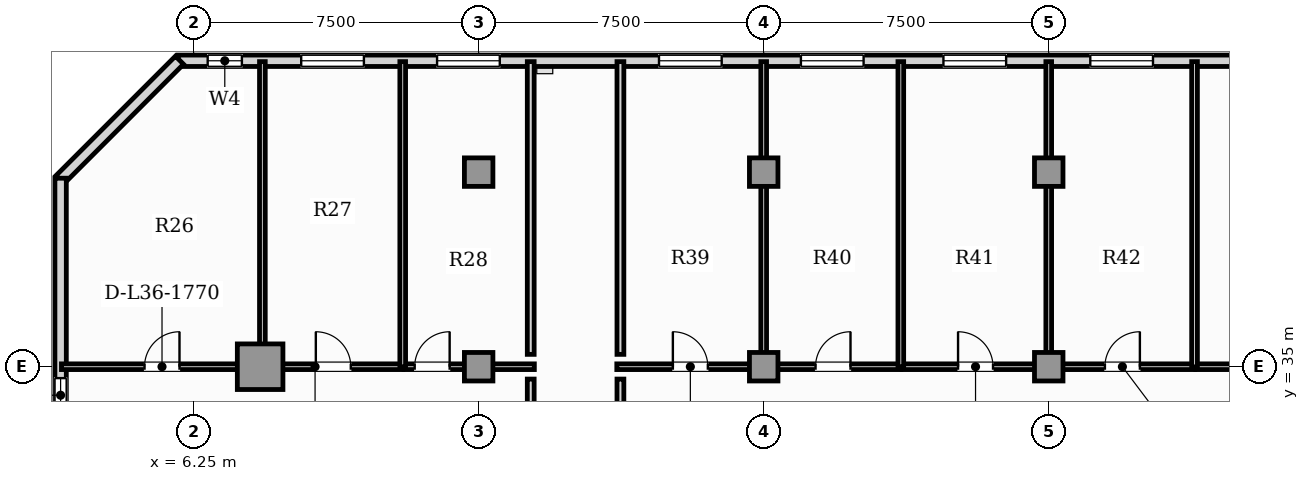
"""IFC4 building model, lengths in metres.
Left out: names, types, materials, properties, quantities, classifications, styles, units other than length and angle.
Written with IfcOpenShell. Run it as: python <this file> out.ifc"""

import sys

from ifc_helpers import new_model, si_unit, direction, frame, frame_2d, origin, origin_2d, place, context, subcontext, project, spatial, rectangle, hollow_rectangle, extrude, element, fill, save


model = new_model("IFC4")
c1 = context("Model", 3, precision=1e-05, world=origin(), true_north=direction((0.0, 1.0)))
c2 = subcontext(c1, "Body", "Model", "MODEL_VIEW")
j1 = project(units=[si_unit("LENGTHUNIT", "METRE"), si_unit("PLANEANGLEUNIT", "RADIAN")], contexts=[c1])
p1 = place(None, origin())
s1 = spatial("IfcSite", under=j1, at=p1, CompositionType="ELEMENT")
p2 = place(p1, origin())
s2 = spatial("IfcBuilding", under=s1, at=p2, CompositionType="ELEMENT")
p3 = place(p2, frame((0.0, 0.0, 149.05)))
s3 = spatial("IfcBuildingStorey", under=s2, at=p3, CompositionType="ELEMENT", Elevation=149.05)
p4 = place(p3, frame((8.0, 35.0, 0.0), z_axis=(0.0, 0.0, 1.0), x_axis=(1.0, 0.0, 0.0)))
e1 = element("IfcColumn", 1, at=p4, inside=s3, PredefinedType="USERDEFINED", context=c2, shape_type="SweptSolid", body=[
    extrude(hollow_rectangle(XDim=1.2, YDim=1.2, WallThickness=0.07, at=origin_2d()), origin(), (0.0, 0.0, 1.0), 3.85),
])
for number, where, z_axis, x_axis in (
    (2, (13.75, 40.12, 0.0), (0.0, 0.0, 1.0), (1.0, 0.0, 0.0)),
    (3, (21.25, 40.12, 0.0), (0.0, 0.0, 1.0), (1.0, 0.0, 0.0)),
    (4, (28.75, 40.12, 0.0), (0.0, 0.0, 1.0), (1.0, 0.0, 0.0)),
    (5, (13.75, 35.0, 0.0), (0.0, 0.0, 1.0), (1.0, 0.0, 0.0)),
    (6, (21.25, 35.0, 0.0), (0.0, 0.0, 1.0), (1.0, 0.0, 0.0)),
    (7, (28.75, 35.0, 0.0), (0.0, 0.0, 1.0), (1.0, 0.0, 0.0)),
):
    element("IfcColumn", number, at=place(p3, frame(where, z_axis=z_axis, x_axis=x_axis)), inside=s3, PredefinedType="COLUMN", context=c2, shape_type="SweptSolid", body=[
        extrude(rectangle(XDim=0.75, YDim=0.75, at=origin_2d()), origin(), (0.0, 0.0, 1.0), 3.85),
    ])
p5 = place(p3, frame((51.66, 43.05, 0.0), z_axis=(0.0, 0.0, 1.0), x_axis=(-1.0, 0.0, 0.0)))
e8 = element("IfcWall", 8, at=p5, inside=s3, PredefinedType="SOLIDWALL", context=c2, shape_type="SweptSolid", body=[
    extrude(rectangle(XDim=45.82, YDim=0.3, at=frame_2d((22.91, 0.0))), origin(), (0.0, 0.0, 1.0), 3.63),
])
p6 = place(p5, frame((44.14, 0.0, 0.95)))
e9 = element("IfcOpeningElement", 9, at=p6, cuts=e8, PredefinedType="OPENING", context=c2, shape_type="SweptSolid", body=[
    extrude(rectangle(XDim=0.9, YDim=1.5, at=frame_2d((0.45, 0.75))), frame((0.0, 0.16, 0.0), z_axis=(0.0, -1.0, 0.0), x_axis=(1.0, 0.0, 0.0)), (0.0, 0.0, 1.0), 0.32),
])
p7 = place(p5, frame((40.929, 0.0, 0.88)))
e10 = element("IfcOpeningElement", 10, at=p7, cuts=e8, PredefinedType="OPENING", context=c2, shape_type="SweptSolid", body=[
    extrude(rectangle(XDim=1.65, YDim=2.0, at=frame_2d((0.825, 1.0))), frame((0.0, 0.16, 0.0), z_axis=(0.0, -1.0, 0.0), x_axis=(1.0, 0.0, 0.0)), (0.0, 0.0, 1.0), 0.32),
])
p8 = place(p5, frame((37.354, 0.0, 0.88)))
e11 = element("IfcOpeningElement", 11, at=p8, cuts=e8, PredefinedType="OPENING", context=c2, shape_type="SweptSolid", body=[
    extrude(rectangle(XDim=1.65, YDim=2.0, at=frame_2d((0.825, 1.0))), frame((0.0, 0.16, 0.0), z_axis=(0.0, -1.0, 0.0), x_axis=(1.0, 0.0, 0.0)), (0.0, 0.0, 1.0), 0.32),
])
p9 = place(p5, frame((31.515, 0.0, 0.88)))
e12 = element("IfcOpeningElement", 12, at=p9, cuts=e8, PredefinedType="OPENING", context=c2, shape_type="SweptSolid", body=[
    extrude(rectangle(XDim=1.65, YDim=2.0, at=frame_2d((0.825, 1.0))), frame((0.0, 0.16, 0.0), z_axis=(0.0, -1.0, 0.0), x_axis=(1.0, 0.0, 0.0)), (0.0, 0.0, 1.0), 0.32),
])
p10 = place(p5, frame((27.781, 0.0, 0.88)))
e13 = element("IfcOpeningElement", 13, at=p10, cuts=e8, PredefinedType="OPENING", context=c2, shape_type="SweptSolid", body=[
    extrude(rectangle(XDim=1.65, YDim=2.0, at=frame_2d((0.825, 1.0))), frame((0.0, 0.16, 0.0), z_axis=(0.0, -1.0, 0.0), x_axis=(1.0, 0.0, 0.0)), (0.0, 0.0, 1.0), 0.32),
])
p11 = place(p5, frame((24.031, 0.0, 0.88)))
e14 = element("IfcOpeningElement", 14, at=p11, cuts=e8, PredefinedType="OPENING", context=c2, shape_type="SweptSolid", body=[
    extrude(rectangle(XDim=1.65, YDim=2.0, at=frame_2d((0.825, 1.0))), frame((0.0, 0.16, 0.0), z_axis=(0.0, -1.0, 0.0), x_axis=(1.0, 0.0, 0.0)), (0.0, 0.0, 1.0), 0.32),
])
p12 = place(p5, frame((20.167, 0.0, 0.88)))
e15 = element("IfcOpeningElement", 15, at=p12, cuts=e8, PredefinedType="OPENING", context=c2, shape_type="SweptSolid", body=[
    extrude(rectangle(XDim=1.65, YDim=2.0, at=frame_2d((0.825, 1.0))), frame((0.0, 0.16, 0.0), z_axis=(0.0, -1.0, 0.0), x_axis=(1.0, 0.0, 0.0)), (0.0, 0.0, 1.0), 0.32),
])
p13 = place(p5, frame((16.37, 0.0, 0.88)))
e16 = element("IfcOpeningElement", 16, at=p13, cuts=e8, PredefinedType="OPENING", context=c2, shape_type="SweptSolid", body=[
    extrude(rectangle(XDim=1.65, YDim=2.0, at=frame_2d((0.825, 1.0))), frame((0.0, 0.16, 0.0), z_axis=(0.0, -1.0, 0.0), x_axis=(1.0, 0.0, 0.0)), (0.0, 0.0, 1.0), 0.32),
])
p14 = place(p5, frame((11.877, 0.0, 0.88)))
e17 = element("IfcOpeningElement", 17, at=p14, cuts=e8, PredefinedType="OPENING", context=c2, shape_type="SweptSolid", body=[
    extrude(rectangle(XDim=1.65, YDim=2.0, at=frame_2d((0.825, 1.0))), frame((0.0, 0.16, 0.0), z_axis=(0.0, -1.0, 0.0), x_axis=(1.0, 0.0, 0.0)), (0.0, 0.0, 1.0), 0.32),
])
p15 = place(p5, frame((7.179, 0.0, 0.88)))
e18 = element("IfcOpeningElement", 18, at=p15, cuts=e8, PredefinedType="OPENING", context=c2, shape_type="SweptSolid", body=[
    extrude(rectangle(XDim=1.65, YDim=2.0, at=frame_2d((0.825, 1.0))), frame((0.0, 0.16, 0.0), z_axis=(0.0, -1.0, 0.0), x_axis=(1.0, 0.0, 0.0)), (0.0, 0.0, 1.0), 0.32),
])
p16 = place(p5, frame((3.146, 0.0, 0.88)))
e19 = element("IfcOpeningElement", 19, at=p16, cuts=e8, PredefinedType="OPENING", context=c2, shape_type="SweptSolid", body=[
    extrude(rectangle(XDim=1.65, YDim=2.0, at=frame_2d((0.825, 1.0))), frame((0.0, 0.16, 0.0), z_axis=(0.0, -1.0, 0.0), x_axis=(1.0, 0.0, 0.0)), (0.0, 0.0, 1.0), 0.32),
])
p17 = place(p3, frame((5.878, 43.066, 0.0), z_axis=(0.0, 0.0, 1.0), x_axis=(-0.707079321262, -0.707134240044, 0.0)))
e20 = element("IfcWall", 20, at=p17, inside=s3, PredefinedType="SOLIDWALL", context=c2, shape_type="SweptSolid", body=[
    extrude(rectangle(XDim=4.446, YDim=0.3, at=frame_2d((2.223, 0.0))), origin(), (0.0, 0.0, 1.0), 3.63),
])
p18 = place(p3, frame((2.75, 39.96, 0.0), z_axis=(0.0, 0.0, 1.0), x_axis=(0.0, -1.0, 0.0)))
e21 = element("IfcWall", 21, at=p18, inside=s3, PredefinedType="SOLIDWALL", context=c2, shape_type="SweptSolid", body=[
    extrude(rectangle(XDim=36.72, YDim=0.3, at=frame_2d((18.36, 0.0))), origin(), (0.0, 0.0, 1.0), 3.63),
])
p19 = place(p18, frame((5.26, 0.0, 0.95)))
e22 = element("IfcOpeningElement", 22, at=p19, cuts=e21, PredefinedType="OPENING", context=c2, shape_type="SweptSolid", body=[
    extrude(rectangle(XDim=0.9, YDim=1.5, at=frame_2d((0.45, 0.75))), frame((0.0, 0.16, 0.0), z_axis=(0.0, -1.0, 0.0), x_axis=(1.0, 0.0, 0.0)), (0.0, 0.0, 1.0), 0.32),
])
p20 = place(p18, frame((19.283, 0.0, 0.88)))
e23 = element("IfcOpeningElement", 23, at=p20, cuts=e21, PredefinedType="OPENING", context=c2, shape_type="SweptSolid", body=[
    extrude(rectangle(XDim=1.65, YDim=2.0, at=frame_2d((0.825, 1.0))), frame((0.0, 0.16, 0.0), z_axis=(0.0, -1.0, 0.0), x_axis=(1.0, 0.0, 0.0)), (0.0, 0.0, 1.0), 0.32),
])
p21 = place(p18, frame((11.663, 0.0, 0.88)))
e24 = element("IfcOpeningElement", 24, at=p21, cuts=e21, PredefinedType="OPENING", context=c2, shape_type="SweptSolid", body=[
    extrude(rectangle(XDim=1.65, YDim=2.0, at=frame_2d((0.825, 1.0))), frame((0.0, 0.16, 0.0), z_axis=(0.0, -1.0, 0.0), x_axis=(1.0, 0.0, 0.0)), (0.0, 0.0, 1.0), 0.32),
])
p22 = place(p3, frame((2.772, 35.0, 0.0), z_axis=(0.0, 0.0, 1.0), x_axis=(1.0, 0.0, 0.0)))
e25 = element("IfcWall", 25, at=p22, inside=s3, PredefinedType="PARTITIONING", context=c2, shape_type="SweptSolid", body=[
    extrude(rectangle(XDim=5.292, YDim=0.15, at=frame_2d((2.646, 0.0))), origin(), (0.0, 0.0, 1.0), 3.63),
])
p23 = place(p22, frame((2.186, 0.0, 0.0)))
e26 = element("IfcOpeningElement", 26, at=p23, cuts=e25, PredefinedType="OPENING", context=c2, shape_type="SweptSolid", body=[
    extrude(rectangle(XDim=0.92, YDim=2.1, at=frame_2d((0.46, 1.05))), frame((0.0, 0.085, 0.0), z_axis=(0.0, -1.0, 0.0), x_axis=(1.0, 0.0, 0.0)), (0.0, 0.0, 1.0), 0.17),
])
p24 = place(p3, frame((8.094, 35.0, 0.0), z_axis=(0.0, 0.0, 1.0), x_axis=(1.0, 0.0, 0.0)))
e27 = element("IfcWall", 27, at=p24, inside=s3, PredefinedType="PARTITIONING", context=c2, shape_type="SweptSolid", body=[
    extrude(rectangle(XDim=3.662, YDim=0.15, at=frame_2d((1.831, 0.0))), origin(), (0.0, 0.0, 1.0), 3.013),
])
p25 = place(p24, frame((1.371, 0.0, 0.0)))
e28 = element("IfcOpeningElement", 28, at=p25, cuts=e27, PredefinedType="OPENING", context=c2, shape_type="SweptSolid", body=[
    extrude(rectangle(XDim=0.92, YDim=2.1, at=frame_2d((0.46, 1.05))), frame((0.0, 0.085, 0.0), z_axis=(0.0, -1.0, 0.0), x_axis=(1.0, 0.0, 0.0)), (0.0, 0.0, 1.0), 0.17),
])
p26 = place(p3, frame((11.787, 35.0, 0.0), z_axis=(0.0, 0.0, 1.0), x_axis=(1.0, 0.0, 0.0)))
e29 = element("IfcWall", 29, at=p26, inside=s3, PredefinedType="PARTITIONING", context=c2, shape_type="SweptSolid", body=[
    extrude(rectangle(XDim=3.428, YDim=0.15, at=frame_2d((1.714, 0.0))), origin(), (0.0, 0.0, 1.0), 3.013),
])
p27 = place(p26, frame((0.28, 0.0, 0.0)))
e30 = element("IfcOpeningElement", 30, at=p27, cuts=e29, PredefinedType="OPENING", context=c2, shape_type="SweptSolid", body=[
    extrude(rectangle(XDim=0.92, YDim=2.1, at=frame_2d((0.46, 1.05))), frame((0.0, 0.085, 0.0), z_axis=(0.0, -1.0, 0.0), x_axis=(1.0, 0.0, 0.0)), (0.0, 0.0, 1.0), 0.17),
])
for number, where, z_axis, x_axis in (
    (31, (8.059, 34.995, 0.0), (0.0, 0.0, 1.0), (0.0, 1.0, 0.0)),
    (32, (11.752, 34.995, 0.0), (0.0, 0.0, 1.0), (0.0, 1.0, 0.0)),
):
    element("IfcWall", number, at=place(p3, frame(where, z_axis=z_axis, x_axis=x_axis)), inside=s3, PredefinedType="PARTITIONING", context=c2, shape_type="SweptSolid", body=[
        extrude(rectangle(XDim=8.032, YDim=0.15, at=frame_2d((4.016, 0.0))), origin(), (0.0, 0.0, 1.0), 3.63),
    ])
p28 = place(p3, frame((17.385, 35.0, 0.0), z_axis=(0.0, 0.0, 1.0), x_axis=(1.0, 0.0, 0.0)))
e33 = element("IfcWall", 33, at=p28, inside=s3, PredefinedType="PARTITIONING", context=c2, shape_type="SweptSolid", body=[
    extrude(rectangle(XDim=3.87, YDim=0.15, at=frame_2d((1.935, 0.0))), origin(), (0.0, 0.0, 1.0), 3.013),
])
p29 = place(p28, frame((1.475, 0.0, 0.0)))
e34 = element("IfcOpeningElement", 34, at=p29, cuts=e33, PredefinedType="OPENING", context=c2, shape_type="SweptSolid", body=[
    extrude(rectangle(XDim=0.92, YDim=2.1, at=frame_2d((0.46, 1.05))), frame((0.0, 0.085, 0.0), z_axis=(0.0, -1.0, 0.0), x_axis=(1.0, 0.0, 0.0)), (0.0, 0.0, 1.0), 0.17),
])
p30 = place(p3, frame((21.285, 35.0, 0.0), z_axis=(0.0, 0.0, 1.0), x_axis=(1.0, 0.0, 0.0)))
e35 = element("IfcWall", 35, at=p30, inside=s3, PredefinedType="PARTITIONING", context=c2, shape_type="SweptSolid", body=[
    extrude(rectangle(XDim=3.578, YDim=0.15, at=frame_2d((1.789, 0.0))), origin(), (0.0, 0.0, 1.0), 3.013),
])
p31 = place(p30, frame((1.329, 0.0, 0.0)))
e36 = element("IfcOpeningElement", 36, at=p31, cuts=e35, PredefinedType="OPENING", context=c2, shape_type="SweptSolid", body=[
    extrude(rectangle(XDim=0.92, YDim=2.1, at=frame_2d((0.46, 1.05))), frame((0.0, 0.085, 0.0), z_axis=(0.0, -1.0, 0.0), x_axis=(1.0, 0.0, 0.0)), (0.0, 0.0, 1.0), 0.17),
])
p32 = place(p3, frame((24.893, 35.0, 0.0), z_axis=(0.0, 0.0, 1.0), x_axis=(1.0, 0.0, 0.0)))
e37 = element("IfcWall", 37, at=p32, inside=s3, PredefinedType="PARTITIONING", context=c2, shape_type="SweptSolid", body=[
    extrude(rectangle(XDim=3.862, YDim=0.15, at=frame_2d((1.931, 0.0))), origin(), (0.0, 0.0, 1.0), 3.013),
])
p33 = place(p32, frame((1.471, 0.0, 0.0)))
e38 = element("IfcOpeningElement", 38, at=p33, cuts=e37, PredefinedType="OPENING", context=c2, shape_type="SweptSolid", body=[
    extrude(rectangle(XDim=0.92, YDim=2.1, at=frame_2d((0.46, 1.05))), frame((0.0, 0.085, 0.0), z_axis=(0.0, -1.0, 0.0), x_axis=(1.0, 0.0, 0.0)), (0.0, 0.0, 1.0), 0.17),
])
p34 = place(p3, frame((28.785, 35.0, 0.0), z_axis=(0.0, 0.0, 1.0), x_axis=(1.0, 0.0, 0.0)))
e39 = element("IfcWall", 39, at=p34, inside=s3, PredefinedType="PARTITIONING", context=c2, shape_type="SweptSolid", body=[
    extrude(rectangle(XDim=3.807, YDim=0.15, at=frame_2d((1.903, 0.0))), origin(), (0.0, 0.0, 1.0), 3.013),
])
p35 = place(p34, frame((1.443, 0.0, 0.0)))
e40 = element("IfcOpeningElement", 40, at=p35, cuts=e39, PredefinedType="OPENING", context=c2, shape_type="SweptSolid", body=[
    extrude(rectangle(XDim=0.92, YDim=2.1, at=frame_2d((0.46, 1.05))), frame((0.0, 0.085, 0.0), z_axis=(0.0, -1.0, 0.0), x_axis=(1.0, 0.0, 0.0)), (0.0, 0.0, 1.0), 0.17),
])
p36 = place(p3, frame((32.622, 35.0, 0.0), z_axis=(0.0, 0.0, 1.0), x_axis=(1.0, 0.0, 0.0)))
e41 = element("IfcWall", 41, at=p36, inside=s3, PredefinedType="PARTITIONING", context=c2, shape_type="SweptSolid", body=[
    extrude(rectangle(XDim=3.728, YDim=0.15, at=frame_2d((1.864, 0.0))), origin(), (0.0, 0.0, 1.0), 3.013),
])
p37 = place(p36, frame((1.404, 0.0, 0.0)))
e42 = element("IfcOpeningElement", 42, at=p37, cuts=e41, PredefinedType="OPENING", context=c2, shape_type="SweptSolid", body=[
    extrude(rectangle(XDim=0.92, YDim=2.1, at=frame_2d((0.46, 1.05))), frame((0.0, 0.085, 0.0), z_axis=(0.0, -1.0, 0.0), x_axis=(1.0, 0.0, 0.0)), (0.0, 0.0, 1.0), 0.17),
])
for number, where, z_axis, x_axis in (
    (43, (21.25, 34.995, 0.0), (0.0, 0.0, 1.0), (0.0, 1.0, 0.0)),
    (44, (24.858, 34.995, 0.0), (0.0, 0.0, 1.0), (0.0, 1.0, 0.0)),
    (45, (28.75, 34.995, 0.0), (0.0, 0.0, 1.0), (0.0, 1.0, 0.0)),
    (46, (32.586, 34.995, 0.0), (0.0, 0.0, 1.0), (0.0, 1.0, 0.0)),
):
    element("IfcWall", number, at=place(p3, frame(where, z_axis=z_axis, x_axis=x_axis)), inside=s3, PredefinedType="PARTITIONING", context=c2, shape_type="SweptSolid", body=[
        extrude(rectangle(XDim=8.032, YDim=0.15, at=frame_2d((4.016, 0.0))), origin(), (0.0, 0.0, 1.0), 3.63),
    ])
p38 = place(p3, frame((15.12, 34.675, 0.0), z_axis=(0.0, 0.0, 1.0), x_axis=(0.0, -1.0, 0.0)))
e47 = element("IfcWall", 47, at=p38, inside=s3, PredefinedType="PARTITIONING", context=c2, shape_type="SweptSolid", body=[
    extrude(rectangle(XDim=0.85, YDim=0.18, at=frame_2d((0.425, 0.0))), origin(), (0.0, 0.0, 1.0), 3.63),
])
p39 = place(p3, frame((15.12, 43.028, 0.0), z_axis=(0.0, 0.0, 1.0), x_axis=(0.0, -1.0, 0.0)))
e48 = element("IfcWall", 48, at=p39, inside=s3, PredefinedType="PARTITIONING", context=c2, shape_type="SweptSolid", body=[
    extrude(rectangle(XDim=7.703, YDim=0.18, at=frame_2d((3.851, 0.0))), origin(), (0.0, 0.0, 1.0), 3.63),
])
p40 = place(p3, frame((17.48, 33.495, 0.0), z_axis=(0.0, 0.0, 1.0), x_axis=(0.0, 1.0, 0.0)))
e49 = element("IfcWall", 49, at=p40, inside=s3, PredefinedType="PARTITIONING", context=c2, shape_type="SweptSolid", body=[
    extrude(rectangle(XDim=1.18, YDim=0.18, at=frame_2d((0.59, 0.0))), origin(), (0.0, 0.0, 1.0), 3.63),
])
p41 = place(p3, frame((17.48, 35.325, 0.0), z_axis=(0.0, 0.0, 1.0), x_axis=(0.0, 1.0, 0.0)))
e50 = element("IfcWall", 50, at=p41, inside=s3, PredefinedType="PARTITIONING", context=c2, shape_type="SweptSolid", body=[
    extrude(rectangle(XDim=7.703, YDim=0.18, at=frame_2d((3.851, 0.0))), origin(), (0.0, 0.0, 1.0), 3.63),
])
p42 = place(p19, origin())
e51 = element("IfcWindow", 51, at=p42, inside=s3, PartitioningType="SINGLE_PANEL", PredefinedType="WINDOW", context=c2, shape_type="SweptSolid", body=[
    extrude(rectangle(XDim=0.9, YDim=1.5, at=frame_2d((0.45, 0.75))), frame((0.0, 0.03, 0.0), z_axis=(0.0, -1.0, 0.0), x_axis=(1.0, 0.0, 0.0)), (0.0, 0.0, 1.0), 0.06),
])
fill(e22, e51)
p43 = place(p6, origin())
e52 = element("IfcWindow", 52, at=p43, inside=s3, PartitioningType="SINGLE_PANEL", PredefinedType="WINDOW", context=c2, shape_type="SweptSolid", body=[
    extrude(rectangle(XDim=0.9, YDim=1.5, at=frame_2d((0.45, 0.75))), frame((0.0, 0.03, 0.0), z_axis=(0.0, -1.0, 0.0), x_axis=(1.0, 0.0, 0.0)), (0.0, 0.0, 1.0), 0.06),
])
fill(e9, e52)
p44 = place(p7, origin())
e53 = element("IfcWindow", 53, at=p44, inside=s3, PartitioningType="SINGLE_PANEL", PredefinedType="WINDOW", context=c2, shape_type="SweptSolid", body=[
    extrude(rectangle(XDim=1.65, YDim=2.0, at=frame_2d((0.825, 1.0))), frame((0.0, 0.03, 0.0), z_axis=(0.0, -1.0, 0.0), x_axis=(1.0, 0.0, 0.0)), (0.0, 0.0, 1.0), 0.06),
])
fill(e10, e53)
p45 = place(p8, origin())
e54 = element("IfcWindow", 54, at=p45, inside=s3, PartitioningType="SINGLE_PANEL", PredefinedType="WINDOW", context=c2, shape_type="SweptSolid", body=[
    extrude(rectangle(XDim=1.65, YDim=2.0, at=frame_2d((0.825, 1.0))), frame((0.0, 0.03, 0.0), z_axis=(0.0, -1.0, 0.0), x_axis=(1.0, 0.0, 0.0)), (0.0, 0.0, 1.0), 0.06),
])
fill(e11, e54)
p46 = place(p9, origin())
e55 = element("IfcWindow", 55, at=p46, inside=s3, PartitioningType="SINGLE_PANEL", PredefinedType="WINDOW", context=c2, shape_type="SweptSolid", body=[
    extrude(rectangle(XDim=1.65, YDim=2.0, at=frame_2d((0.825, 1.0))), frame((0.0, 0.03, 0.0), z_axis=(0.0, -1.0, 0.0), x_axis=(1.0, 0.0, 0.0)), (0.0, 0.0, 1.0), 0.06),
])
fill(e12, e55)
p47 = place(p10, origin())
e56 = element("IfcWindow", 56, at=p47, inside=s3, PartitioningType="SINGLE_PANEL", PredefinedType="WINDOW", context=c2, shape_type="SweptSolid", body=[
    extrude(rectangle(XDim=1.65, YDim=2.0, at=frame_2d((0.825, 1.0))), frame((0.0, 0.03, 0.0), z_axis=(0.0, -1.0, 0.0), x_axis=(1.0, 0.0, 0.0)), (0.0, 0.0, 1.0), 0.06),
])
fill(e13, e56)
p48 = place(p11, origin())
e57 = element("IfcWindow", 57, at=p48, inside=s3, PartitioningType="SINGLE_PANEL", PredefinedType="WINDOW", context=c2, shape_type="SweptSolid", body=[
    extrude(rectangle(XDim=1.65, YDim=2.0, at=frame_2d((0.825, 1.0))), frame((0.0, 0.03, 0.0), z_axis=(0.0, -1.0, 0.0), x_axis=(1.0, 0.0, 0.0)), (0.0, 0.0, 1.0), 0.06),
])
fill(e14, e57)
p49 = place(p12, origin())
e58 = element("IfcWindow", 58, at=p49, inside=s3, PartitioningType="SINGLE_PANEL", PredefinedType="WINDOW", context=c2, shape_type="SweptSolid", body=[
    extrude(rectangle(XDim=1.65, YDim=2.0, at=frame_2d((0.825, 1.0))), frame((0.0, 0.03, 0.0), z_axis=(0.0, -1.0, 0.0), x_axis=(1.0, 0.0, 0.0)), (0.0, 0.0, 1.0), 0.06),
])
fill(e15, e58)
p50 = place(p23, origin())
e59 = element("IfcDoor", 59, at=p50, inside=s3, OperationType="SINGLE_SWING_RIGHT", PredefinedType="DOOR", context=c2, shape_type="SweptSolid", body=[
    extrude(rectangle(XDim=0.92, YDim=2.1, at=frame_2d((0.46, 1.05))), frame((0.0, 0.025, 0.0), z_axis=(0.0, -1.0, 0.0), x_axis=(1.0, 0.0, 0.0)), (0.0, 0.0, 1.0), 0.05),
])
fill(e26, e59)
p51 = place(p25, origin())
e60 = element("IfcDoor", 60, at=p51, inside=s3, OperationType="SINGLE_SWING_LEFT", PredefinedType="DOOR", context=c2, shape_type="SweptSolid", body=[
    extrude(rectangle(XDim=0.92, YDim=2.1, at=frame_2d((0.46, 1.05))), frame((0.0, 0.025, 0.0), z_axis=(0.0, -1.0, 0.0), x_axis=(1.0, 0.0, 0.0)), (0.0, 0.0, 1.0), 0.05),
])
fill(e28, e60)
p52 = place(p27, origin())
e61 = element("IfcDoor", 61, at=p52, inside=s3, OperationType="SINGLE_SWING_RIGHT", PredefinedType="DOOR", context=c2, shape_type="SweptSolid", body=[
    extrude(rectangle(XDim=0.92, YDim=2.1, at=frame_2d((0.46, 1.05))), frame((0.0, 0.025, 0.0), z_axis=(0.0, -1.0, 0.0), x_axis=(1.0, 0.0, 0.0)), (0.0, 0.0, 1.0), 0.05),
])
fill(e30, e61)
p53 = place(p29, origin())
e62 = element("IfcDoor", 62, at=p53, inside=s3, OperationType="SINGLE_SWING_LEFT", PredefinedType="DOOR", context=c2, shape_type="SweptSolid", body=[
    extrude(rectangle(XDim=0.92, YDim=2.1, at=frame_2d((0.46, 1.05))), frame((0.0, 0.025, 0.0), z_axis=(0.0, -1.0, 0.0), x_axis=(1.0, 0.0, 0.0)), (0.0, 0.0, 1.0), 0.05),
])
fill(e34, e62)
p54 = place(p31, origin())
e63 = element("IfcDoor", 63, at=p54, inside=s3, OperationType="SINGLE_SWING_RIGHT", PredefinedType="DOOR", context=c2, shape_type="SweptSolid", body=[
    extrude(rectangle(XDim=0.92, YDim=2.1, at=frame_2d((0.46, 1.05))), frame((0.0, 0.025, 0.0), z_axis=(0.0, -1.0, 0.0), x_axis=(1.0, 0.0, 0.0)), (0.0, 0.0, 1.0), 0.05),
])
fill(e36, e63)
p55 = place(p33, origin())
e64 = element("IfcDoor", 64, at=p55, inside=s3, OperationType="SINGLE_SWING_LEFT", PredefinedType="DOOR", context=c2, shape_type="SweptSolid", body=[
    extrude(rectangle(XDim=0.92, YDim=2.1, at=frame_2d((0.46, 1.05))), frame((0.0, 0.025, 0.0), z_axis=(0.0, -1.0, 0.0), x_axis=(1.0, 0.0, 0.0)), (0.0, 0.0, 1.0), 0.05),
])
fill(e38, e64)
p56 = place(p35, origin())
e65 = element("IfcDoor", 65, at=p56, inside=s3, OperationType="SINGLE_SWING_RIGHT", PredefinedType="DOOR", context=c2, shape_type="SweptSolid", body=[
    extrude(rectangle(XDim=0.92, YDim=2.1, at=frame_2d((0.46, 1.05))), frame((0.0, 0.025, 0.0), z_axis=(0.0, -1.0, 0.0), x_axis=(1.0, 0.0, 0.0)), (0.0, 0.0, 1.0), 0.05),
])
fill(e40, e65)
save(model, sys.argv[1])
